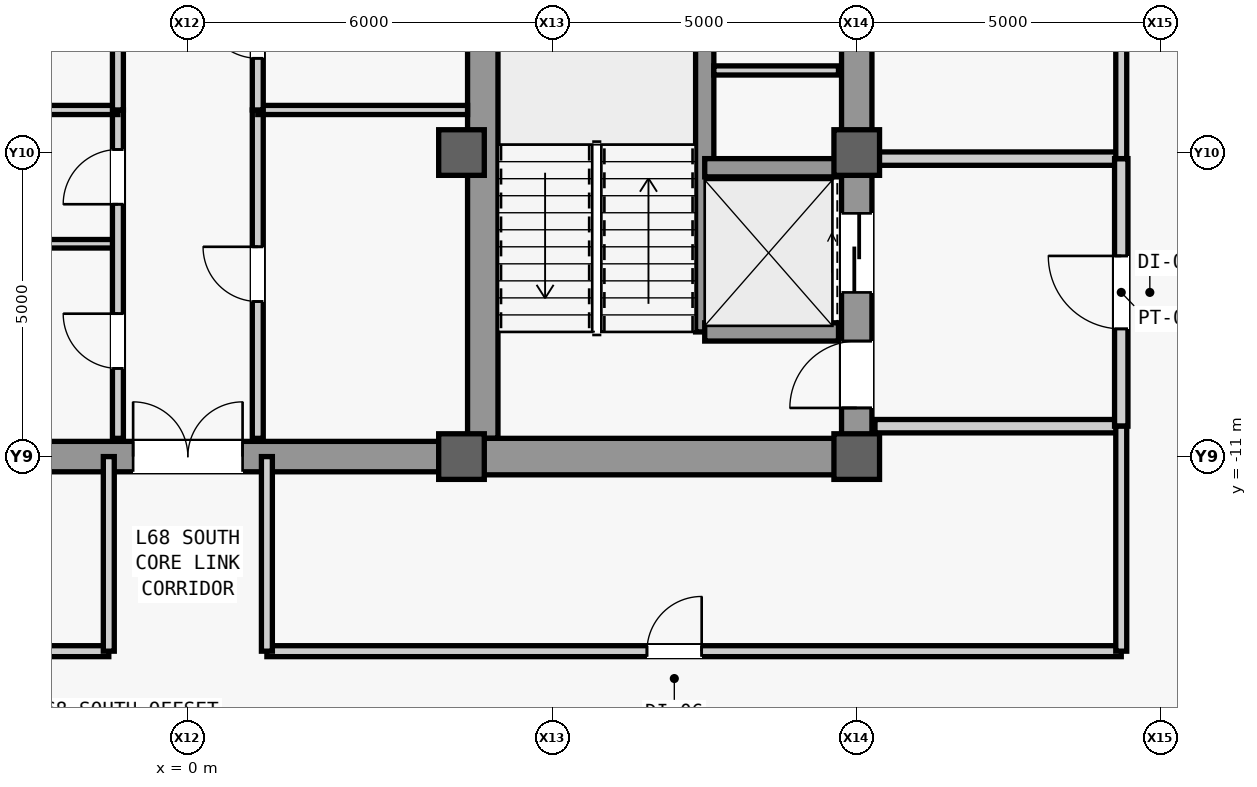
"""IFC4 building model, lengths in metres.
Left out: names, types, materials, properties, quantities, classifications, styles, units other than length and angle.
Written with IfcOpenShell. Run it as: python <this file> out.ifc"""

import sys

from ifc_helpers import new_model, si_unit, direction, frame, frame_2d, origin, origin_2d, place, context, subcontext, project, spatial, rectangle, extrude, source, transform, mapped, element, fill, save


model = new_model("IFC4")
c1 = context("Model", 3, precision=1e-05, world=origin(), true_north=direction((0.0, 1.0)))
c2 = subcontext(c1, "Body", "Model", "MODEL_VIEW")
j1 = project(units=[si_unit("LENGTHUNIT", "METRE"), si_unit("PLANEANGLEUNIT", "RADIAN")], contexts=[c1])
p1 = place(None, origin())
s1 = spatial("IfcSite", under=j1, at=p1, CompositionType="ELEMENT")
p2 = place(p1, origin())
s2 = spatial("IfcBuilding", under=s1, at=p2, CompositionType="ELEMENT")
p3 = place(p2, frame((0.0, 0.0, 289.5)))
s3 = spatial("IfcBuildingStorey", under=s2, at=p3, CompositionType="ELEMENT", Elevation=289.5)
m1 = source(origin(), c2, "Body", "SweptSolid", [
    extrude(rectangle(XDim=22.0, YDim=0.5, at=frame_2d((11.0, 0.0))), origin(), (0.0, 0.0, 1.0), 3.78),
])
p4 = place(p3, frame((11.0, -11.0, 0.0), z_axis=(0.0, 0.0, 1.0), x_axis=(0.0, 1.0, 0.0)))
e1 = element("IfcWall", 1, at=p4, inside=s3, PredefinedType="SHEAR", context=c2, shape_type="MappedRepresentation", body=[
    mapped(m1, transform((0.0, 0.0, 0.0), scale=1.0)),
])
m2 = source(origin(), c2, "Body", "SweptSolid", [
    extrude(rectangle(XDim=1.1, YDim=2.2, at=frame_2d((0.55, 1.1))), frame((0.0, 0.26, 0.0), z_axis=(0.0, -1.0, 0.0), x_axis=(1.0, 0.0, 0.0)), (0.0, 0.0, 1.0), 0.52),
])
p5 = place(p4, frame((0.8, 0.0, 0.0)))
e2 = element("IfcOpeningElement", 2, at=p5, cuts=e1, PredefinedType="OPENING", context=c2, shape_type="MappedRepresentation", body=[
    mapped(m2, transform((0.0, 0.0, 0.0), scale=1.0)),
])
m3 = source(origin(), c2, "Body", "SweptSolid", [
    extrude(rectangle(XDim=0.9, YDim=2.15, at=frame_2d((0.45, 1.075))), frame((0.0, 0.26, 0.0), z_axis=(0.0, -1.0, 0.0), x_axis=(1.0, 0.0, 0.0)), (0.0, 0.0, 1.0), 0.52),
])
p6 = place(p4, frame((7.575, 0.0, 0.0)))
e3 = element("IfcOpeningElement", 3, at=p6, cuts=e1, PredefinedType="OPENING", context=c2, shape_type="MappedRepresentation", body=[
    mapped(m3, transform((0.0, 0.0, 0.0), scale=1.0)),
])
m4 = source(origin(), c2, "Body", "SweptSolid", [
    extrude(rectangle(XDim=1.2, YDim=2.3, at=frame_2d((0.6, 1.15))), frame((0.0, 0.26, 0.0), z_axis=(0.0, -1.0, 0.0), x_axis=(1.0, 0.0, 0.0)), (0.0, 0.0, 1.0), 0.52),
])
p7 = place(p4, frame((17.6, 0.0, 0.0)))
e4 = element("IfcOpeningElement", 4, at=p7, cuts=e1, PredefinedType="OPENING", context=c2, shape_type="MappedRepresentation", body=[
    mapped(m4, transform((0.0, 0.0, 0.0), scale=1.0)),
])
p8 = place(p4, frame((19.6, 0.0, 0.0)))
e5 = element("IfcOpeningElement", 5, at=p8, cuts=e1, PredefinedType="OPENING", context=c2, shape_type="MappedRepresentation", body=[
    mapped(m4, transform((0.0, 0.0, 0.0), scale=1.0)),
])
m5 = source(origin(), c2, "Body", "SweptSolid", [
    extrude(rectangle(XDim=1.3, YDim=2.3, at=frame_2d((0.65, 1.15))), frame((0.0, 0.26, 0.0), z_axis=(0.0, -1.0, 0.0), x_axis=(1.0, 0.0, 0.0)), (0.0, 0.0, 1.0), 0.52),
])
p9 = place(p4, frame((2.7, 0.0, 0.0)))
e6 = element("IfcOpeningElement", 6, at=p9, cuts=e1, PredefinedType="OPENING", context=c2, shape_type="MappedRepresentation", body=[
    mapped(m5, transform((0.0, 0.0, 0.0), scale=1.0)),
])
p10 = place(p4, frame((13.35, 0.0, 0.0)))
e7 = element("IfcOpeningElement", 7, at=p10, cuts=e1, PredefinedType="OPENING", context=c2, shape_type="MappedRepresentation", body=[
    mapped(m5, transform((0.0, 0.0, 0.0), scale=1.0)),
])
m6 = source(origin(), c2, "Body", "SweptSolid", [
    extrude(rectangle(XDim=21.4, YDim=0.5, at=frame_2d((10.7, 0.0))), origin(), (0.0, 0.0, 1.0), 3.78),
])
p11 = place(p3, frame((4.85, -10.7, 0.0), z_axis=(0.0, 0.0, 1.0), x_axis=(0.0, 1.0, 0.0)))
e8 = element("IfcWall", 8, at=p11, inside=s3, PredefinedType="SHEAR", context=c2, shape_type="MappedRepresentation", body=[
    mapped(m6, transform((0.0, 0.0, 0.0), scale=1.0)),
])
m7 = source(origin(), c2, "Body", "SweptSolid", [
    extrude(rectangle(XDim=5.9, YDim=0.6, at=frame_2d((2.95, 0.0))), origin(), (0.0, 0.0, 1.0), 3.78),
])
p12 = place(p3, frame((4.85, -11.0, 0.0), z_axis=(0.0, 0.0, 1.0), x_axis=(1.0, 0.0, 0.0)))
e9 = element("IfcWall", 9, at=p12, inside=s3, PredefinedType="SHEAR", context=c2, shape_type="MappedRepresentation", body=[
    mapped(m7, transform((0.0, 0.0, 0.0), scale=1.0)),
])
m8 = source(origin(), c2, "Body", "SweptSolid", [
    extrude(rectangle(XDim=9.2, YDim=0.5, at=frame_2d((4.6, 0.0))), origin(), (0.0, 0.0, 1.0), 3.78),
])
p13 = place(p3, frame((-4.6, -11.0, 0.0), z_axis=(0.0, 0.0, 1.0), x_axis=(1.0, 0.0, 0.0)))
e10 = element("IfcWall", 10, at=p13, inside=s3, PredefinedType="SHEAR", context=c2, shape_type="MappedRepresentation", body=[
    mapped(m8, transform((0.0, 0.0, 0.0), scale=1.0)),
])
m9 = source(origin(), c2, "Body", "SweptSolid", [
    extrude(rectangle(XDim=1.8, YDim=2.25, at=frame_2d((0.9, 1.125))), frame((0.0, 0.26, 0.0), z_axis=(0.0, -1.0, 0.0), x_axis=(1.0, 0.0, 0.0)), (0.0, 0.0, 1.0), 0.52),
])
p14 = place(p13, frame((3.7, 0.0, 0.0)))
e11 = element("IfcOpeningElement", 11, at=p14, cuts=e10, PredefinedType="OPENING", context=c2, shape_type="MappedRepresentation", body=[
    mapped(m9, transform((0.0, 0.0, 0.0), scale=1.0)),
])
m10 = source(origin(), c2, "Body", "SweptSolid", [
    extrude(rectangle(XDim=0.75, YDim=0.75, at=origin_2d()), origin(), (0.0, 0.0, 1.0), 4.0),
])
for number, where, z_axis, x_axis in (
    (12, (4.5, -11.0, 0.0), (0.0, 0.0, 1.0), (1.0, 0.0, 0.0)),
    (13, (4.5, -6.0, 0.0), (0.0, 0.0, 1.0), (1.0, 0.0, 0.0)),
    (14, (11.0, -11.0, 0.0), (0.0, 0.0, 1.0), (1.0, 0.0, 0.0)),
    (15, (11.0, -6.0, 0.0), (0.0, 0.0, 1.0), (1.0, 0.0, 0.0)),
):
    element("IfcColumn", number, at=place(p3, frame(where, z_axis=z_axis, x_axis=x_axis)), inside=s3, PredefinedType="COLUMN", context=c2, shape_type="MappedRepresentation", body=[
        mapped(m10, transform((0.0, 0.0, 0.0), scale=1.0)),
    ])
m11 = source(origin(), c2, "Body", "SweptSolid", [
    extrude(rectangle(XDim=7.8, YDim=0.3, at=frame_2d((3.9, 0.0))), origin(), (0.0, 0.0, 1.0), 3.78),
])
p15 = place(p3, frame((8.5, -8.95, 0.0), z_axis=(0.0, 0.0, 1.0), x_axis=(0.0, 1.0, 0.0)))
e16 = element("IfcWall", 16, at=p15, inside=s3, PredefinedType="SHEAR", context=c2, shape_type="MappedRepresentation", body=[
    mapped(m11, transform((0.0, 0.0, 0.0), scale=1.0)),
])
m12 = source(origin(), c2, "Body", "SweptSolid", [
    extrude(rectangle(XDim=2.2, YDim=0.3, at=frame_2d((1.1, 0.0))), origin(), (0.0, 0.0, 1.0), 3.78),
])
for number, where, z_axis, x_axis in (
    (17, (8.5, -8.95, 0.0), (0.0, 0.0, 1.0), (1.0, 0.0, 0.0)),
    (18, (8.5, -6.25, 0.0), (0.0, 0.0, 1.0), (1.0, 0.0, 0.0)),
):
    element("IfcWall", number, at=place(p3, frame(where, z_axis=z_axis, x_axis=x_axis)), inside=s3, PredefinedType="SHEAR", context=c2, shape_type="MappedRepresentation", body=[
        mapped(m12, transform((0.0, 0.0, 0.0), scale=1.0)),
    ])
m13 = source(origin(), c2, "Body", "SweptSolid", [
    extrude(rectangle(XDim=2.05, YDim=0.15, at=frame_2d((1.025, 0.0))), origin(), (0.0, 0.0, 1.0), 3.78),
])
p16 = place(p3, frame((8.65, -4.65, 0.0), z_axis=(0.0, 0.0, 1.0), x_axis=(1.0, 0.0, 0.0)))
e19 = element("IfcWall", 19, at=p16, inside=s3, PredefinedType="PARTITIONING", context=c2, shape_type="MappedRepresentation", body=[
    mapped(m13, transform((0.0, 0.0, 0.0), scale=1.0)),
])
m14 = source(origin(), c2, "Body", "SweptSolid", [
    extrude(rectangle(XDim=4.05, YDim=0.22, at=frame_2d((2.025, 0.0))), origin(), (0.0, 0.0, 1.0), 3.78),
])
p17 = place(p3, frame((11.3, -10.5, 0.0), z_axis=(0.0, 0.0, 1.0), x_axis=(1.0, 0.0, 0.0)))
e20 = element("IfcWall", 20, at=p17, inside=s3, PredefinedType="PARTITIONING", context=c2, shape_type="MappedRepresentation", body=[
    mapped(m14, transform((0.0, 0.0, 0.0), scale=1.0)),
])
m15 = source(origin(), c2, "Body", "SweptSolid", [
    extrude(rectangle(XDim=4.05, YDim=0.22, at=frame_2d((2.025, 0.0))), origin(), (0.0, 0.0, 1.0), 3.085),
])
p18 = place(p3, frame((11.3, -6.1, 0.0), z_axis=(0.0, 0.0, 1.0), x_axis=(1.0, 0.0, 0.0)))
e21 = element("IfcWall", 21, at=p18, inside=s3, PredefinedType="PARTITIONING", context=c2, shape_type="MappedRepresentation", body=[
    mapped(m15, transform((0.0, 0.0, 0.0), scale=1.0)),
])
m16 = source(origin(), c2, "Body", "SweptSolid", [
    extrude(rectangle(XDim=4.4, YDim=0.22, at=frame_2d((2.2, 0.0))), origin(), (0.0, 0.0, 1.0), 3.78),
])
p19 = place(p3, frame((15.35, -10.5, 0.0), z_axis=(0.0, 0.0, 1.0), x_axis=(0.0, 1.0, 0.0)))
e22 = element("IfcWall", 22, at=p19, inside=s3, PredefinedType="PARTITIONING", context=c2, shape_type="MappedRepresentation", body=[
    mapped(m16, transform((0.0, 0.0, 0.0), scale=1.0)),
])
m17 = source(origin(), c2, "Body", "SweptSolid", [
    extrude(rectangle(XDim=1.2, YDim=2.2, at=frame_2d((0.6, 1.1))), frame((0.0, 0.12, 0.0), z_axis=(0.0, -1.0, 0.0), x_axis=(1.0, 0.0, 0.0)), (0.0, 0.0, 1.0), 0.24),
])
p20 = place(p19, frame((1.6, 0.0, 0.0)))
e23 = element("IfcOpeningElement", 23, at=p20, cuts=e22, PredefinedType="OPENING", context=c2, shape_type="MappedRepresentation", body=[
    mapped(m17, transform((0.0, 0.0, 0.0), scale=1.0)),
])
m18 = source(origin(), c2, "Body", "SweptSolid", [
    extrude(rectangle(XDim=16.6, YDim=0.18, at=frame_2d((8.3, 0.0))), origin(), (0.0, 0.0, 1.0), 3.78),
])
p21 = place(p3, frame((15.35, -6.1, 0.0), z_axis=(0.0, 0.0, 1.0), x_axis=(0.0, 1.0, 0.0)))
e24 = element("IfcWall", 24, at=p21, inside=s3, PredefinedType="PARTITIONING", context=c2, shape_type="MappedRepresentation", body=[
    mapped(m18, transform((0.0, 0.0, 0.0), scale=1.0)),
])
m19 = source(origin(), c2, "Body", "SweptSolid", [
    extrude(rectangle(XDim=1.8, YDim=2.25, at=frame_2d((0.9, 1.125))), frame((0.0, 0.1, 0.0), z_axis=(0.0, -1.0, 0.0), x_axis=(1.0, 0.0, 0.0)), (0.0, 0.0, 1.0), 0.2),
])
p22 = place(p21, frame((2.7, 0.0, 0.0)))
e25 = element("IfcOpeningElement", 25, at=p22, cuts=e24, PredefinedType="OPENING", context=c2, shape_type="MappedRepresentation", body=[
    mapped(m19, transform((0.0, 0.0, 0.0), scale=1.0)),
])
p23 = place(p21, frame((13.0, 0.0, 0.0)))
e26 = element("IfcOpeningElement", 26, at=p23, cuts=e24, PredefinedType="OPENING", context=c2, shape_type="MappedRepresentation", body=[
    mapped(m19, transform((0.0, 0.0, 0.0), scale=1.0)),
])
m20 = source(origin(), c2, "Body", "SweptSolid", [
    extrude(rectangle(XDim=3.45, YDim=0.14, at=frame_2d((1.725, 0.0))), origin(), (0.0, 0.0, 1.0), 3.78),
])
p24 = place(p3, frame((-4.6, -7.5, 0.0), z_axis=(0.0, 0.0, 1.0), x_axis=(1.0, 0.0, 0.0)))
e27 = element("IfcWall", 27, at=p24, inside=s3, PredefinedType="PARTITIONING", context=c2, shape_type="MappedRepresentation", body=[
    mapped(m20, transform((0.0, 0.0, 0.0), scale=1.0)),
])
m21 = source(origin(), c2, "Body", "SweptSolid", [
    extrude(rectangle(XDim=5.4, YDim=0.18, at=frame_2d((2.7, 0.0))), origin(), (0.0, 0.0, 1.0), 3.78),
])
p25 = place(p3, frame((-1.15, -10.7, 0.0), z_axis=(0.0, 0.0, 1.0), x_axis=(0.0, 1.0, 0.0)))
e28 = element("IfcWall", 28, at=p25, inside=s3, PredefinedType="PARTITIONING", context=c2, shape_type="MappedRepresentation", body=[
    mapped(m21, transform((0.0, 0.0, 0.0), scale=1.0)),
])
m22 = source(origin(), c2, "Body", "SweptSolid", [
    extrude(rectangle(XDim=0.9, YDim=2.15, at=frame_2d((0.45, 1.075))), frame((0.0, 0.1, 0.0), z_axis=(0.0, -1.0, 0.0), x_axis=(1.0, 0.0, 0.0)), (0.0, 0.0, 1.0), 0.2),
])
p26 = place(p25, frame((1.15, 0.0, 0.0)))
e29 = element("IfcOpeningElement", 29, at=p26, cuts=e28, PredefinedType="OPENING", context=c2, shape_type="MappedRepresentation", body=[
    mapped(m22, transform((0.0, 0.0, 0.0), scale=1.0)),
])
p27 = place(p25, frame((3.85, 0.0, 0.0)))
e30 = element("IfcOpeningElement", 30, at=p27, cuts=e28, PredefinedType="OPENING", context=c2, shape_type="MappedRepresentation", body=[
    mapped(m22, transform((0.0, 0.0, 0.0), scale=1.0)),
])
p28 = place(p3, frame((1.15, -10.7, 0.0), z_axis=(0.0, 0.0, 1.0), x_axis=(0.0, 1.0, 0.0)))
e31 = element("IfcWall", 31, at=p28, inside=s3, PredefinedType="PARTITIONING", context=c2, shape_type="MappedRepresentation", body=[
    mapped(m21, transform((0.0, 0.0, 0.0), scale=1.0)),
])
p29 = place(p28, frame((2.25, 0.0, 0.0)))
e32 = element("IfcOpeningElement", 32, at=p29, cuts=e31, PredefinedType="OPENING", context=c2, shape_type="MappedRepresentation", body=[
    mapped(m22, transform((0.0, 0.0, 0.0), scale=1.0)),
])
m23 = source(origin(), c2, "Body", "SweptSolid", [
    extrude(rectangle(XDim=3.45, YDim=0.15, at=frame_2d((1.725, 0.0))), origin(), (0.0, 0.0, 1.0), 3.78),
])
for number, where, z_axis, x_axis in (
    (33, (-4.6, -5.3, 0.0), (0.0, 0.0, 1.0), (1.0, 0.0, 0.0)),
    (34, (1.15, -5.3, 0.0), (0.0, 0.0, 1.0), (1.0, 0.0, 0.0)),
):
    element("IfcWall", number, at=place(p3, frame(where, z_axis=z_axis, x_axis=x_axis)), inside=s3, PredefinedType="PARTITIONING", context=c2, shape_type="MappedRepresentation", body=[
        mapped(m23, transform((0.0, 0.0, 0.0), scale=1.0)),
    ])
m24 = source(origin(), c2, "Body", "SweptSolid", [
    extrude(rectangle(XDim=10.6, YDim=0.18, at=frame_2d((5.3, 0.0))), origin(), (0.0, 0.0, 1.0), 3.78),
])
p30 = place(p3, frame((-1.15, -5.3, 0.0), z_axis=(0.0, 0.0, 1.0), x_axis=(0.0, 1.0, 0.0)))
e35 = element("IfcWall", 35, at=p30, inside=s3, PredefinedType="PARTITIONING", context=c2, shape_type="MappedRepresentation", body=[
    mapped(m24, transform((0.0, 0.0, 0.0), scale=1.0)),
])
p31 = place(p30, frame((1.9, 0.0, 0.0)))
e36 = element("IfcOpeningElement", 36, at=p31, cuts=e35, PredefinedType="OPENING", context=c2, shape_type="MappedRepresentation", body=[
    mapped(m22, transform((0.0, 0.0, 0.0), scale=1.0)),
])
p32 = place(p30, frame((6.55, 0.0, 0.0)))
e37 = element("IfcOpeningElement", 37, at=p32, cuts=e35, PredefinedType="OPENING", context=c2, shape_type="MappedRepresentation", body=[
    mapped(m22, transform((0.0, 0.0, 0.0), scale=1.0)),
])
p33 = place(p30, frame((9.475, 0.0, 0.0)))
e38 = element("IfcOpeningElement", 38, at=p33, cuts=e35, PredefinedType="OPENING", context=c2, shape_type="MappedRepresentation", body=[
    mapped(m22, transform((0.0, 0.0, 0.0), scale=1.0)),
])
p34 = place(p3, frame((1.15, -5.3, 0.0), z_axis=(0.0, 0.0, 1.0), x_axis=(0.0, 1.0, 0.0)))
e39 = element("IfcWall", 39, at=p34, inside=s3, PredefinedType="PARTITIONING", context=c2, shape_type="MappedRepresentation", body=[
    mapped(m24, transform((0.0, 0.0, 0.0), scale=1.0)),
])
p35 = place(p34, frame((0.85, 0.0, 0.0)))
e40 = element("IfcOpeningElement", 40, at=p35, cuts=e39, PredefinedType="OPENING", context=c2, shape_type="MappedRepresentation", body=[
    mapped(m22, transform((0.0, 0.0, 0.0), scale=1.0)),
])
p36 = place(p34, frame((3.55, 0.0, 0.0)))
e41 = element("IfcOpeningElement", 41, at=p36, cuts=e39, PredefinedType="OPENING", context=c2, shape_type="MappedRepresentation", body=[
    mapped(m22, transform((0.0, 0.0, 0.0), scale=1.0)),
])
p37 = place(p34, frame((6.3, 0.0, 0.0)))
e42 = element("IfcOpeningElement", 42, at=p37, cuts=e39, PredefinedType="OPENING", context=c2, shape_type="MappedRepresentation", body=[
    mapped(m22, transform((0.0, 0.0, 0.0), scale=1.0)),
])
p38 = place(p34, frame((8.25, 0.0, 0.0)))
e43 = element("IfcOpeningElement", 43, at=p38, cuts=e39, PredefinedType="OPENING", context=c2, shape_type="MappedRepresentation", body=[
    mapped(m22, transform((0.0, 0.0, 0.0), scale=1.0)),
])
p39 = place(p34, frame((9.475, 0.0, 0.0)))
e44 = element("IfcOpeningElement", 44, at=p39, cuts=e39, PredefinedType="OPENING", context=c2, shape_type="MappedRepresentation", body=[
    mapped(m22, transform((0.0, 0.0, 0.0), scale=1.0)),
])
m25 = source(origin(), c2, "Body", "SweptSolid", [
    extrude(rectangle(XDim=16.1, YDim=0.18, at=frame_2d((8.05, 0.0))), origin(), (0.0, 0.0, 1.0), 3.78),
])
p40 = place(p3, frame((-17.4, -14.2, 0.0), z_axis=(0.0, 0.0, 1.0), x_axis=(1.0, 0.0, 0.0)))
e45 = element("IfcWall", 45, at=p40, inside=s3, PredefinedType="PARTITIONING", context=c2, shape_type="MappedRepresentation", body=[
    mapped(m25, transform((0.0, 0.0, 0.0), scale=1.0)),
])
p41 = place(p40, frame((8.95, 0.0, 0.0)))
e46 = element("IfcOpeningElement", 46, at=p41, cuts=e45, PredefinedType="OPENING", context=c2, shape_type="MappedRepresentation", body=[
    mapped(m22, transform((0.0, 0.0, 0.0), scale=1.0)),
])
m26 = source(origin(), c2, "Body", "SweptSolid", [
    extrude(rectangle(XDim=3.2, YDim=0.18, at=frame_2d((1.6, 0.0))), origin(), (0.0, 0.0, 1.0), 3.78),
])
p42 = place(p3, frame((-1.3, -14.2, 0.0), z_axis=(0.0, 0.0, 1.0), x_axis=(0.0, 1.0, 0.0)))
e47 = element("IfcWall", 47, at=p42, inside=s3, PredefinedType="PARTITIONING", context=c2, shape_type="MappedRepresentation", body=[
    mapped(m26, transform((0.0, 0.0, 0.0), scale=1.0)),
])
m27 = source(origin(), c2, "Body", "SweptSolid", [
    extrude(rectangle(XDim=14.05, YDim=0.18, at=frame_2d((7.025, 0.0))), origin(), (0.0, 0.0, 1.0), 3.78),
])
p43 = place(p3, frame((1.3, -14.2, 0.0), z_axis=(0.0, 0.0, 1.0), x_axis=(1.0, 0.0, 0.0)))
e48 = element("IfcWall", 48, at=p43, inside=s3, PredefinedType="PARTITIONING", context=c2, shape_type="MappedRepresentation", body=[
    mapped(m27, transform((0.0, 0.0, 0.0), scale=1.0)),
])
p44 = place(p43, frame((6.25, 0.0, 0.0)))
e49 = element("IfcOpeningElement", 49, at=p44, cuts=e48, PredefinedType="OPENING", context=c2, shape_type="MappedRepresentation", body=[
    mapped(m22, transform((0.0, 0.0, 0.0), scale=1.0)),
])
p45 = place(p3, frame((1.3, -14.2, 0.0), z_axis=(0.0, 0.0, 1.0), x_axis=(0.0, 1.0, 0.0)))
e50 = element("IfcWall", 50, at=p45, inside=s3, PredefinedType="PARTITIONING", context=c2, shape_type="MappedRepresentation", body=[
    mapped(m26, transform((0.0, 0.0, 0.0), scale=1.0)),
])
m28 = source(origin(), c2, "Body", "SweptSolid", [
    extrude(rectangle(XDim=3.7, YDim=0.18, at=frame_2d((1.85, 0.0))), origin(), (0.0, 0.0, 1.0), 3.78),
])
p46 = place(p3, frame((15.35, -14.2, 0.0), z_axis=(0.0, 0.0, 1.0), x_axis=(0.0, 1.0, 0.0)))
e51 = element("IfcWall", 51, at=p46, inside=s3, PredefinedType="PARTITIONING", context=c2, shape_type="MappedRepresentation", body=[
    mapped(m28, transform((0.0, 0.0, 0.0), scale=1.0)),
])
m29 = source(origin(), c2, "Body", "SweptSolid", [
    extrude(rectangle(XDim=1.1, YDim=2.2, at=frame_2d((0.55, 1.1))), frame((0.0, 0.025, 0.0), z_axis=(0.0, -1.0, 0.0), x_axis=(1.0, 0.0, 0.0)), (0.0, 0.0, 1.0), 0.05),
])
p47 = place(p5, origin())
e52 = element("IfcDoor", 52, at=p47, inside=s3, OperationType="SINGLE_SWING_LEFT", PredefinedType="DOOR", context=c2, shape_type="MappedRepresentation", body=[
    mapped(m29, transform((0.0, 0.0, 0.0), scale=1.0)),
])
fill(e2, e52)
m30 = source(origin(), c2, "Body", "SweptSolid", [
    extrude(rectangle(XDim=1.2, YDim=2.2, at=frame_2d((0.6, 1.1))), frame((0.0, 0.025, 0.0), z_axis=(0.0, -1.0, 0.0), x_axis=(1.0, 0.0, 0.0)), (0.0, 0.0, 1.0), 0.05),
])
p48 = place(p20, origin())
e53 = element("IfcDoor", 53, at=p48, inside=s3, OperationType="SINGLE_SWING_RIGHT", PredefinedType="DOOR", context=c2, shape_type="MappedRepresentation", body=[
    mapped(m30, transform((0.0, 0.0, 0.0), scale=1.0)),
])
fill(e23, e53)
m31 = source(origin(), c2, "Body", "SweptSolid", [
    extrude(rectangle(XDim=0.9, YDim=2.15, at=frame_2d((0.45, 1.075))), frame((0.0, 0.025, 0.0), z_axis=(0.0, -1.0, 0.0), x_axis=(1.0, 0.0, 0.0)), (0.0, 0.0, 1.0), 0.05),
])
p49 = place(p26, origin())
e54 = element("IfcDoor", 54, at=p49, inside=s3, OperationType="SINGLE_SWING_RIGHT", PredefinedType="DOOR", context=c2, shape_type="MappedRepresentation", body=[
    mapped(m31, transform((0.0, 0.0, 0.0), scale=1.0)),
])
fill(e29, e54)
p50 = place(p27, origin())
e55 = element("IfcDoor", 55, at=p50, inside=s3, OperationType="SINGLE_SWING_LEFT", PredefinedType="DOOR", context=c2, shape_type="MappedRepresentation", body=[
    mapped(m31, transform((0.0, 0.0, 0.0), scale=1.0)),
])
fill(e30, e55)
p51 = place(p29, origin())
e56 = element("IfcDoor", 56, at=p51, inside=s3, OperationType="SINGLE_SWING_RIGHT", PredefinedType="DOOR", context=c2, shape_type="MappedRepresentation", body=[
    mapped(m31, transform((0.0, 0.0, 0.0), scale=1.0)),
])
fill(e32, e56)
m32 = source(origin(), c2, "Body", "SweptSolid", [
    extrude(rectangle(XDim=1.8, YDim=2.25, at=frame_2d((0.9, 1.125))), frame((0.0, 0.025, 0.0), z_axis=(0.0, -1.0, 0.0), x_axis=(1.0, 0.0, 0.0)), (0.0, 0.0, 1.0), 0.05),
])
p52 = place(p14, origin())
e57 = element("IfcDoor", 57, at=p52, inside=s3, OperationType="SINGLE_SWING_LEFT", PredefinedType="DOOR", context=c2, shape_type="MappedRepresentation", body=[
    mapped(m32, transform((0.0, 0.0, 0.0), scale=1.0)),
])
fill(e11, e57)
p53 = place(p35, origin())
e58 = element("IfcDoor", 58, at=p53, inside=s3, OperationType="SINGLE_SWING_RIGHT", PredefinedType="DOOR", context=c2, shape_type="MappedRepresentation", body=[
    mapped(m31, transform((0.0, 0.0, 0.0), scale=1.0)),
])
fill(e40, e58)
p54 = place(p44, origin())
e59 = element("IfcDoor", 59, at=p54, inside=s3, OperationType="SINGLE_SWING_RIGHT", PredefinedType="DOOR", context=c2, shape_type="MappedRepresentation", body=[
    mapped(m31, transform((0.0, 0.0, 0.0), scale=1.0)),
])
fill(e49, e59)
m33 = source(origin(), c2, "Body", "SweptSolid", [
    extrude(rectangle(XDim=1.3, YDim=2.3, at=frame_2d((0.65, 1.15))), frame((0.0, 0.025, 0.0), z_axis=(0.0, -1.0, 0.0), x_axis=(1.0, 0.0, 0.0)), (0.0, 0.0, 1.0), 0.05),
])
p55 = place(p9, origin())
e60 = element("IfcDoor", 60, at=p55, inside=s3, OperationType="SLIDING_TO_LEFT", PredefinedType="DOOR", context=c2, shape_type="MappedRepresentation", body=[
    mapped(m33, transform((0.0, 0.0, 0.0), scale=1.0)),
])
fill(e6, e60)
save(model, sys.argv[1])
